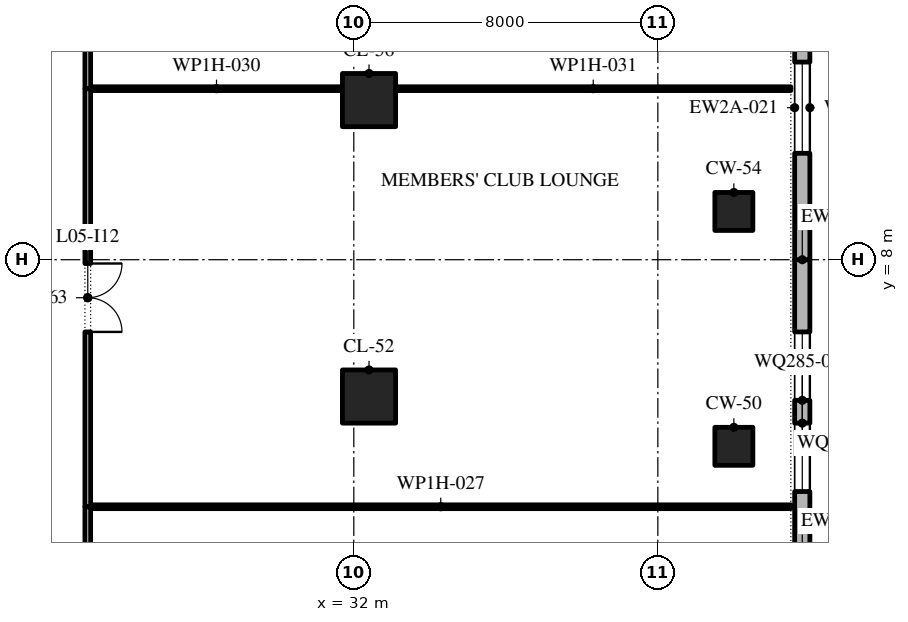
"""IFC4 building model, lengths in metres.
Left out: names, types, materials, properties, quantities, classifications, styles, units other than length and angle.
Written with IfcOpenShell. Run it as: python <this file> out.ifc"""

import sys

from ifc_helpers import new_model, si_unit, direction, frame, frame_2d, origin, origin_2d, place, context, subcontext, project, spatial, polyline, rectangle, outline, extrude, element, fill, save


model = new_model("IFC4")
c1 = context("Model", 3, precision=1e-05, world=origin(), true_north=direction((0.0, 1.0)))
c2 = subcontext(c1, "Body", "Model", "MODEL_VIEW")
j1 = project(units=[si_unit("LENGTHUNIT", "METRE"), si_unit("PLANEANGLEUNIT", "RADIAN")], contexts=[c1])
p1 = place(None, origin())
s1 = spatial("IfcSite", under=j1, at=p1, CompositionType="ELEMENT")
p2 = place(p1, origin())
s2 = spatial("IfcBuilding", under=s1, at=p2, CompositionType="ELEMENT")
p3 = place(p2, frame((0.0, 0.0, 28.8)))
s3 = spatial("IfcBuildingStorey", under=s2, at=p3, CompositionType="ELEMENT", Elevation=28.8)
p4 = place(p3, frame((42.0, 3.09, 0.0), z_axis=(0.0, 0.0, 1.0), x_axis=(1.0, 0.0, 0.0)))
e1 = element("IfcColumn", 1, at=p4, inside=s3, PredefinedType="COLUMN", context=c2, shape_type="SweptSolid", body=[
    extrude(rectangle(XDim=1.0, YDim=1.0, at=origin_2d()), origin(), (0.0, 0.0, 1.0), 4.35),
])
p5 = place(p3, frame((32.4, 4.4, 0.0), z_axis=(0.0, 0.0, 1.0), x_axis=(1.0, 0.0, 0.0)))
e2 = element("IfcColumn", 2, at=p5, inside=s3, PredefinedType="COLUMN", context=c2, shape_type="SweptSolid", body=[
    extrude(rectangle(XDim=1.4, YDim=1.4, at=origin_2d()), origin(), (0.0, 0.0, 1.0), 4.8),
])
p6 = place(p3, frame((42.0, 9.27, 0.0), z_axis=(0.0, 0.0, 1.0), x_axis=(1.0, 0.0, 0.0)))
e3 = element("IfcColumn", 3, at=p6, inside=s3, PredefinedType="COLUMN", context=c2, shape_type="SweptSolid", body=[
    extrude(rectangle(XDim=1.0, YDim=1.0, at=origin_2d()), origin(), (0.0, 0.0, 1.0), 4.35),
])
p7 = place(p3, frame((32.4, 12.2, 0.0), z_axis=(0.0, 0.0, 1.0), x_axis=(1.0, 0.0, 0.0)))
e4 = element("IfcColumn", 4, at=p7, inside=s3, PredefinedType="COLUMN", context=c2, shape_type="SweptSolid", body=[
    extrude(rectangle(XDim=1.4, YDim=1.4, at=origin_2d()), origin(), (0.0, 0.0, 1.0), 4.8),
])
p8 = place(p3, frame((43.8, 0.0, 0.0), z_axis=(0.0, 0.0, 1.0), x_axis=(0.0, 1.0, 0.0)))
e5 = element("IfcWall", 5, at=p8, inside=s3, PredefinedType="STANDARD", context=c2, shape_type="SweptSolid", body=[
    extrude(rectangle(XDim=8.0, YDim=0.4, at=frame_2d((4.0, 0.0))), origin(), (0.0, 0.0, 1.0), 4.35),
])
p9 = place(p8, frame((1.9, 0.0, 0.9)))
e6 = element("IfcOpeningElement", 6, at=p9, cuts=e5, PredefinedType="OPENING", context=c2, shape_type="SweptSolid", body=[
    extrude(outline(polyline([(0.0, 0.0), (1.8, 0.0), (1.8, 1.425), (1.784, 1.646), (1.738, 1.864), (1.661, 2.072), (1.556, 2.268), (1.425, 2.447), (1.269, 2.605), (1.093, 2.741), (0.9, 2.85), (0.707, 2.741), (0.531, 2.605), (0.375, 2.447), (0.244, 2.268), (0.139, 2.072), (0.062, 1.864), (0.016, 1.646), (0.0, 1.425), (0.0, 0.0)])), frame((0.0, 0.21, 0.0), z_axis=(0.0, -1.0, 0.0), x_axis=(1.0, 0.0, 0.0)), (0.0, 0.0, 1.0), 0.42),
])
p10 = place(p8, frame((4.3, 0.0, 0.9)))
e7 = element("IfcOpeningElement", 7, at=p10, cuts=e5, PredefinedType="OPENING", context=c2, shape_type="SweptSolid", body=[
    extrude(outline(polyline([(0.0, 0.0), (1.8, 0.0), (1.8, 1.425), (1.784, 1.646), (1.738, 1.864), (1.661, 2.072), (1.556, 2.268), (1.425, 2.447), (1.269, 2.605), (1.093, 2.741), (0.9, 2.85), (0.707, 2.741), (0.531, 2.605), (0.375, 2.447), (0.244, 2.268), (0.139, 2.072), (0.062, 1.864), (0.016, 1.646), (0.0, 1.425), (0.0, 0.0)])), frame((0.0, 0.21, 0.0), z_axis=(0.0, -1.0, 0.0), x_axis=(1.0, 0.0, 0.0)), (0.0, 0.0, 1.0), 0.42),
])
p11 = place(p3, frame((43.8, 8.0, 0.0), z_axis=(0.0, 0.0, 1.0), x_axis=(0.0, 1.0, 0.0)))
e8 = element("IfcWall", 8, at=p11, inside=s3, PredefinedType="STANDARD", context=c2, shape_type="SweptSolid", body=[
    extrude(rectangle(XDim=8.0, YDim=0.4, at=frame_2d((4.0, 0.0))), origin(), (0.0, 0.0, 1.0), 4.35),
])
p12 = place(p11, frame((2.8, 0.0, 0.9)))
e9 = element("IfcOpeningElement", 9, at=p12, cuts=e8, PredefinedType="OPENING", context=c2, shape_type="SweptSolid", body=[
    extrude(outline(polyline([(0.0, 0.0), (2.4, 0.0), (2.4, 1.425), (2.378, 1.677), (2.312, 1.921), (2.205, 2.15), (2.06, 2.356), (1.881, 2.535), (1.674, 2.679), (1.444, 2.785), (1.2, 2.85), (0.956, 2.785), (0.726, 2.679), (0.519, 2.535), (0.34, 2.356), (0.195, 2.15), (0.088, 1.921), (0.022, 1.677), (0.0, 1.425), (0.0, 0.0)])), frame((0.0, 0.21, 0.0), z_axis=(0.0, -1.0, 0.0), x_axis=(1.0, 0.0, 0.0)), (0.0, 0.0, 1.0), 0.42),
])
p13 = place(p3, frame((25.075, 1.5, 0.0), z_axis=(0.0, 0.0, 1.0), x_axis=(1.0, 0.0, 0.0)))
e10 = element("IfcWall", 10, at=p13, inside=s3, PredefinedType="PARTITIONING", context=c2, shape_type="SweptSolid", body=[
    extrude(rectangle(XDim=18.425, YDim=0.1, at=frame_2d((9.212, 0.0))), origin(), (0.0, 0.0, 1.0), 4.35),
])
p14 = place(p3, frame((25.075, 12.5, 0.0), z_axis=(0.0, 0.0, 1.0), x_axis=(1.0, 0.0, 0.0)))
e11 = element("IfcWall", 11, at=p14, inside=s3, PredefinedType="PARTITIONING", context=c2, shape_type="SweptSolid", body=[
    extrude(rectangle(XDim=6.625, YDim=0.1, at=frame_2d((3.312, 0.0))), origin(), (0.0, 0.0, 1.0), 4.35),
])
p15 = place(p3, frame((33.1, 12.5, 0.0), z_axis=(0.0, 0.0, 1.0), x_axis=(1.0, 0.0, 0.0)))
e12 = element("IfcWall", 12, at=p15, inside=s3, PredefinedType="PARTITIONING", context=c2, shape_type="SweptSolid", body=[
    extrude(rectangle(XDim=10.4, YDim=0.1, at=frame_2d((5.2, 0.0))), origin(), (0.0, 0.0, 1.0), 4.35),
])
p16 = place(p3, frame((25.0, -9.0, 0.0), z_axis=(0.0, 0.0, 1.0), x_axis=(0.0, 1.0, 0.0)))
e13 = element("IfcWall", 13, at=p16, inside=s3, PredefinedType="PARTITIONING", context=c2, shape_type="SweptSolid", body=[
    extrude(rectangle(XDim=10.5, YDim=0.15, at=frame_2d((5.25, 0.0))), origin(), (0.0, 0.0, 1.0), 4.35),
])
p17 = place(p16, frame((4.35, 0.0, 0.0)))
e14 = element("IfcOpeningElement", 14, at=p17, cuts=e13, PredefinedType="OPENING", context=c2, shape_type="SweptSolid", body=[
    extrude(rectangle(XDim=1.8, YDim=2.1, at=frame_2d((0.9, 1.05))), frame((0.0, 0.085, 0.0), z_axis=(0.0, -1.0, 0.0), x_axis=(1.0, 0.0, 0.0)), (0.0, 0.0, 1.0), 0.17),
])
p18 = place(p3, frame((25.0, 1.5, 0.0), z_axis=(0.0, 0.0, 1.0), x_axis=(0.0, 1.0, 0.0)))
e15 = element("IfcWall", 15, at=p18, inside=s3, PredefinedType="PARTITIONING", context=c2, shape_type="SweptSolid", body=[
    extrude(rectangle(XDim=11.0, YDim=0.15, at=frame_2d((5.5, 0.0))), origin(), (0.0, 0.0, 1.0), 4.35),
])
p19 = place(p18, frame((4.6, 0.0, 0.0)))
e16 = element("IfcOpeningElement", 16, at=p19, cuts=e15, PredefinedType="OPENING", context=c2, shape_type="SweptSolid", body=[
    extrude(rectangle(XDim=1.8, YDim=2.1, at=frame_2d((0.9, 1.05))), frame((0.0, 0.085, 0.0), z_axis=(0.0, -1.0, 0.0), x_axis=(1.0, 0.0, 0.0)), (0.0, 0.0, 1.0), 0.17),
])
p20 = place(p3, frame((25.0, 12.5, 0.0), z_axis=(0.0, 0.0, 1.0), x_axis=(0.0, 1.0, 0.0)))
e17 = element("IfcWall", 17, at=p20, inside=s3, PredefinedType="PARTITIONING", context=c2, shape_type="SweptSolid", body=[
    extrude(rectangle(XDim=13.5, YDim=0.15, at=frame_2d((6.75, 0.0))), origin(), (0.0, 0.0, 1.0), 4.35),
])
p21 = place(p20, frame((5.85, 0.0, 0.0)))
e18 = element("IfcOpeningElement", 18, at=p21, cuts=e17, PredefinedType="OPENING", context=c2, shape_type="SweptSolid", body=[
    extrude(rectangle(XDim=1.8, YDim=2.1, at=frame_2d((0.9, 1.05))), frame((0.0, 0.085, 0.0), z_axis=(0.0, -1.0, 0.0), x_axis=(1.0, 0.0, 0.0)), (0.0, 0.0, 1.0), 0.17),
])
p22 = place(p9, origin())
e19 = element("IfcWindow", 19, at=p22, inside=s3, PartitioningType="DOUBLE_PANEL_VERTICAL", PredefinedType="WINDOW", context=c2, shape_type="SweptSolid", body=[
    extrude(outline(polyline([(0.0, 0.0), (1.8, 0.0), (1.8, 1.425), (1.784, 1.646), (1.738, 1.864), (1.661, 2.072), (1.556, 2.268), (1.425, 2.447), (1.269, 2.605), (1.093, 2.741), (0.9, 2.85), (0.707, 2.741), (0.531, 2.605), (0.375, 2.447), (0.244, 2.268), (0.139, 2.072), (0.062, 1.864), (0.016, 1.646), (0.0, 1.425), (0.0, 0.0)])), frame((0.0, 0.03, 0.0), z_axis=(0.0, -1.0, 0.0), x_axis=(1.0, 0.0, 0.0)), (0.0, 0.0, 1.0), 0.06),
])
fill(e6, e19)
p23 = place(p10, origin())
e20 = element("IfcWindow", 20, at=p23, inside=s3, PartitioningType="DOUBLE_PANEL_VERTICAL", PredefinedType="WINDOW", context=c2, shape_type="SweptSolid", body=[
    extrude(outline(polyline([(0.0, 0.0), (1.8, 0.0), (1.8, 1.425), (1.784, 1.646), (1.738, 1.864), (1.661, 2.072), (1.556, 2.268), (1.425, 2.447), (1.269, 2.605), (1.093, 2.741), (0.9, 2.85), (0.707, 2.741), (0.531, 2.605), (0.375, 2.447), (0.244, 2.268), (0.139, 2.072), (0.062, 1.864), (0.016, 1.646), (0.0, 1.425), (0.0, 0.0)])), frame((0.0, 0.03, 0.0), z_axis=(0.0, -1.0, 0.0), x_axis=(1.0, 0.0, 0.0)), (0.0, 0.0, 1.0), 0.06),
])
fill(e7, e20)
p24 = place(p12, origin())
e21 = element("IfcWindow", 21, at=p24, inside=s3, PartitioningType="DOUBLE_PANEL_VERTICAL", PredefinedType="WINDOW", context=c2, shape_type="SweptSolid", body=[
    extrude(outline(polyline([(0.0, 0.0), (2.4, 0.0), (2.4, 1.425), (2.378, 1.677), (2.312, 1.921), (2.205, 2.15), (2.06, 2.356), (1.881, 2.535), (1.674, 2.679), (1.444, 2.785), (1.2, 2.85), (0.956, 2.785), (0.726, 2.679), (0.519, 2.535), (0.34, 2.356), (0.195, 2.15), (0.088, 1.921), (0.022, 1.677), (0.0, 1.425), (0.0, 0.0)])), frame((0.0, 0.03, 0.0), z_axis=(0.0, -1.0, 0.0), x_axis=(1.0, 0.0, 0.0)), (0.0, 0.0, 1.0), 0.06),
])
fill(e9, e21)
p25 = place(p19, frame((1.8, 0.0, 0.0), z_axis=(0.0, 0.0, 1.0), x_axis=(-1.0, 0.0, 0.0)))
e22 = element("IfcDoor", 22, at=p25, inside=s3, OperationType="SINGLE_SWING_LEFT", PredefinedType="DOOR", context=c2, shape_type="SweptSolid", body=[
    extrude(rectangle(XDim=1.8, YDim=2.1, at=frame_2d((0.9, 1.05))), frame((0.0, 0.025, 0.0), z_axis=(0.0, -1.0, 0.0), x_axis=(1.0, 0.0, 0.0)), (0.0, 0.0, 1.0), 0.05),
])
fill(e16, e22)
save(model, sys.argv[1])
